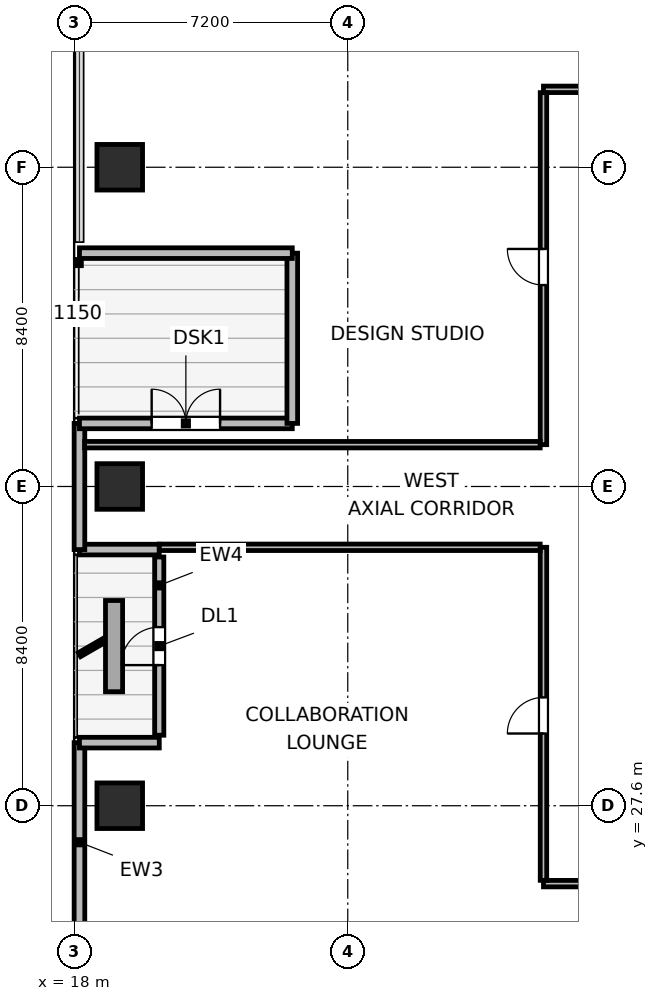
"""IFC4 building model, lengths in metres.
Left out: names, types, materials, properties, quantities, classifications, styles, units other than length and angle.
Written with IfcOpenShell. Run it as: python <this file> out.ifc"""

import sys

from ifc_helpers import new_model, si_unit, direction, frame, frame_2d, origin, origin_2d, place, context, subcontext, project, spatial, rectangle, extrude, element, fill, save


model = new_model("IFC4")
c1 = context("Model", 3, precision=1e-05, world=origin(), true_north=direction((0.0, 1.0)))
c2 = subcontext(c1, "Body", "Model", "MODEL_VIEW")
j1 = project(units=[si_unit("LENGTHUNIT", "METRE"), si_unit("PLANEANGLEUNIT", "RADIAN")], contexts=[c1])
p1 = place(None, origin())
s1 = spatial("IfcSite", under=j1, at=p1, CompositionType="ELEMENT")
p2 = place(p1, origin())
s2 = spatial("IfcBuilding", under=s1, at=p2, CompositionType="ELEMENT")
p3 = place(p2, frame((0.0, 0.0, 181.8)))
s3 = spatial("IfcBuildingStorey", under=s2, at=p3, CompositionType="ELEMENT", Elevation=181.8)
for number, where, z_axis, x_axis in (
    (1, (19.2, 27.6, 0.0), (0.0, 0.0, 1.0), (1.0, 0.0, 0.0)),
    (2, (19.2, 36.0, 0.0), (0.0, 0.0, 1.0), (1.0, 0.0, 0.0)),
    (3, (19.2, 44.4, 0.0), (0.0, 0.0, 1.0), (1.0, 0.0, 0.0)),
):
    element("IfcColumn", number, at=place(p3, frame(where, z_axis=z_axis, x_axis=x_axis)), inside=s3, PredefinedType="COLUMN", context=c2, shape_type="SweptSolid", body=[
        extrude(rectangle(XDim=1.2, YDim=1.2, at=origin_2d()), origin(), (0.0, 0.0, 1.0), 4.5),
    ])
p4 = place(p3, frame((18.14, 24.018, 0.0), z_axis=(0.0, 0.0, 1.0), x_axis=(0.0, 1.0, 0.0)))
e4 = element("IfcWall", 4, at=p4, inside=s3, PredefinedType="SOLIDWALL", context=c2, shape_type="SweptSolid", body=[
    extrude(rectangle(XDim=5.242, YDim=0.28, at=frame_2d((2.621, 0.0))), origin(), (0.0, 0.0, 1.0), 4.28),
])
p5 = place(p3, frame((18.14, 29.26, 0.0), z_axis=(0.0, 0.0, 1.0), x_axis=(1.0, 0.0, 0.0)))
e5 = element("IfcWall", 5, at=p5, inside=s3, PredefinedType="SOLIDWALL", context=c2, shape_type="SweptSolid", body=[
    extrude(rectangle(XDim=2.1, YDim=0.28, at=frame_2d((1.05, 0.0))), origin(), (0.0, 0.0, 1.0), 3.716),
])
p6 = place(p3, frame((20.24, 29.455, 0.0), z_axis=(0.0, 0.0, 1.0), x_axis=(0.0, 1.0, 0.0)))
e6 = element("IfcWall", 6, at=p6, inside=s3, PredefinedType="SOLIDWALL", context=c2, shape_type="SweptSolid", body=[
    extrude(rectangle(XDim=4.69, YDim=0.24, at=frame_2d((2.345, 0.0))), origin(), (0.0, 0.0, 1.0), 3.848),
])
p7 = place(p6, frame((1.845, 0.0, 0.0)))
e7 = element("IfcOpeningElement", 7, at=p7, cuts=e6, PredefinedType="OPENING", context=c2, shape_type="SweptSolid", body=[
    extrude(rectangle(XDim=1.0, YDim=2.02, at=frame_2d((0.5, 1.01))), frame((0.0, 0.13, 0.0), z_axis=(0.0, -1.0, 0.0), x_axis=(1.0, 0.0, 0.0)), (0.0, 0.0, 1.0), 0.26),
])
p8 = place(p3, frame((20.24, 34.34, 0.0), z_axis=(0.0, 0.0, 1.0), x_axis=(-1.0, 0.0, 0.0)))
e8 = element("IfcWall", 8, at=p8, inside=s3, PredefinedType="SOLIDWALL", context=c2, shape_type="SweptSolid", body=[
    extrude(rectangle(XDim=2.1, YDim=0.28, at=frame_2d((1.05, 0.0))), origin(), (0.0, 0.0, 1.0), 3.716),
])
p9 = place(p3, frame((18.14, 34.34, 0.0), z_axis=(0.0, 0.0, 1.0), x_axis=(0.0, 1.0, 0.0)))
e9 = element("IfcWall", 9, at=p9, inside=s3, PredefinedType="SOLIDWALL", context=c2, shape_type="SweptSolid", body=[
    extrude(rectangle(XDim=3.32, YDim=0.28, at=frame_2d((1.66, 0.0))), origin(), (0.0, 0.0, 1.0), 4.28),
])
p10 = place(p3, frame((18.14, 37.66, 0.0), z_axis=(0.0, 0.0, 1.0), x_axis=(1.0, 0.0, 0.0)))
e10 = element("IfcWall", 10, at=p10, inside=s3, PredefinedType="SOLIDWALL", context=c2, shape_type="SweptSolid", body=[
    extrude(rectangle(XDim=5.6, YDim=0.28, at=frame_2d((2.8, 0.0))), origin(), (0.0, 0.0, 1.0), 3.716),
])
p11 = place(p10, frame((1.9, 0.0, 0.0)))
e11 = element("IfcOpeningElement", 11, at=p11, cuts=e10, PredefinedType="OPENING", context=c2, shape_type="SweptSolid", body=[
    extrude(rectangle(XDim=1.8, YDim=2.1, at=frame_2d((0.9, 1.05))), frame((0.0, 0.15, 0.0), z_axis=(0.0, -1.0, 0.0), x_axis=(1.0, 0.0, 0.0)), (0.0, 0.0, 1.0), 0.3),
])
p12 = place(p3, frame((23.74, 37.66, 0.0), z_axis=(0.0, 0.0, 1.0), x_axis=(0.0, 1.0, 0.0)))
e12 = element("IfcWall", 12, at=p12, inside=s3, PredefinedType="SOLIDWALL", context=c2, shape_type="SweptSolid", body=[
    extrude(rectangle(XDim=4.48, YDim=0.28, at=frame_2d((2.24, 0.0))), origin(), (0.0, 0.0, 1.0), 3.848),
])
p13 = place(p3, frame((23.74, 42.14, 0.0), z_axis=(0.0, 0.0, 1.0), x_axis=(-1.0, 0.0, 0.0)))
e13 = element("IfcWall", 13, at=p13, inside=s3, PredefinedType="SOLIDWALL", context=c2, shape_type="SweptSolid", body=[
    extrude(rectangle(XDim=5.6, YDim=0.28, at=frame_2d((2.8, 0.0))), origin(), (0.0, 0.0, 1.0), 3.716),
])
p14 = place(p3, frame((30.35, 25.55, 0.0), z_axis=(0.0, 0.0, 1.0), x_axis=(1.0, 0.0, 0.0)))
e14 = element("IfcWall", 14, at=p14, inside=s3, PredefinedType="PARTITIONING", context=c2, shape_type="SweptSolid", body=[
    extrude(rectangle(XDim=33.25, YDim=0.17, at=frame_2d((16.625, 0.0))), origin(), (0.0, 0.0, 1.0), 4.28),
])
p15 = place(p14, frame((7.84, 0.0, 0.0)))
e15 = element("IfcOpeningElement", 15, at=p15, cuts=e14, PredefinedType="OPENING", context=c2, shape_type="SweptSolid", body=[
    extrude(rectangle(XDim=0.95, YDim=2.04, at=frame_2d((0.475, 1.02))), frame((0.0, 0.095, 0.0), z_axis=(0.0, -1.0, 0.0), x_axis=(1.0, 0.0, 0.0)), (0.0, 0.0, 1.0), 0.19),
])
p16 = place(p14, frame((24.465, 0.0, 0.0)))
e16 = element("IfcOpeningElement", 16, at=p16, cuts=e14, PredefinedType="OPENING", context=c2, shape_type="SweptSolid", body=[
    extrude(rectangle(XDim=0.95, YDim=2.04, at=frame_2d((0.475, 1.02))), frame((0.0, 0.095, 0.0), z_axis=(0.0, -1.0, 0.0), x_axis=(1.0, 0.0, 0.0)), (0.0, 0.0, 1.0), 0.19),
])
p17 = place(p3, frame((30.35, 46.45, 0.0), z_axis=(0.0, 0.0, 1.0), x_axis=(1.0, 0.0, 0.0)))
e17 = element("IfcWall", 17, at=p17, inside=s3, PredefinedType="PARTITIONING", context=c2, shape_type="SweptSolid", body=[
    extrude(rectangle(XDim=33.25, YDim=0.17, at=frame_2d((16.625, 0.0))), origin(), (0.0, 0.0, 1.0), 4.28),
])
p18 = place(p17, frame((3.83, 0.0, 0.0)))
e18 = element("IfcOpeningElement", 18, at=p18, cuts=e17, PredefinedType="OPENING", context=c2, shape_type="SweptSolid", body=[
    extrude(rectangle(XDim=0.95, YDim=2.04, at=frame_2d((0.475, 1.02))), frame((0.0, 0.095, 0.0), z_axis=(0.0, -1.0, 0.0), x_axis=(1.0, 0.0, 0.0)), (0.0, 0.0, 1.0), 0.19),
])
p19 = place(p17, frame((9.495, 0.0, 0.0)))
e19 = element("IfcOpeningElement", 19, at=p19, cuts=e17, PredefinedType="OPENING", context=c2, shape_type="SweptSolid", body=[
    extrude(rectangle(XDim=0.95, YDim=2.04, at=frame_2d((0.475, 1.02))), frame((0.0, 0.095, 0.0), z_axis=(0.0, -1.0, 0.0), x_axis=(1.0, 0.0, 0.0)), (0.0, 0.0, 1.0), 0.19),
])
p20 = place(p17, frame((14.915, 0.0, 0.0)))
e20 = element("IfcOpeningElement", 20, at=p20, cuts=e17, PredefinedType="OPENING", context=c2, shape_type="SweptSolid", body=[
    extrude(rectangle(XDim=0.95, YDim=2.04, at=frame_2d((0.475, 1.02))), frame((0.0, 0.095, 0.0), z_axis=(0.0, -1.0, 0.0), x_axis=(1.0, 0.0, 0.0)), (0.0, 0.0, 1.0), 0.19),
])
p21 = place(p17, frame((21.945, 0.0, 0.0)))
e21 = element("IfcOpeningElement", 21, at=p21, cuts=e17, PredefinedType="OPENING", context=c2, shape_type="SweptSolid", body=[
    extrude(rectangle(XDim=0.95, YDim=2.04, at=frame_2d((0.475, 1.02))), frame((0.0, 0.095, 0.0), z_axis=(0.0, -1.0, 0.0), x_axis=(1.0, 0.0, 0.0)), (0.0, 0.0, 1.0), 0.19),
])
p22 = place(p17, frame((28.845, 0.0, 0.0)))
e22 = element("IfcOpeningElement", 22, at=p22, cuts=e17, PredefinedType="OPENING", context=c2, shape_type="SweptSolid", body=[
    extrude(rectangle(XDim=0.95, YDim=2.04, at=frame_2d((0.475, 1.02))), frame((0.0, 0.095, 0.0), z_axis=(0.0, -1.0, 0.0), x_axis=(1.0, 0.0, 0.0)), (0.0, 0.0, 1.0), 0.19),
])
p23 = place(p3, frame((30.35, 25.637, 0.0), z_axis=(0.0, 0.0, 1.0), x_axis=(0.0, 1.0, 0.0)))
e23 = element("IfcWall", 23, at=p23, inside=s3, PredefinedType="PARTITIONING", context=c2, shape_type="SweptSolid", body=[
    extrude(rectangle(XDim=8.763, YDim=0.17, at=frame_2d((4.381, 0.0))), origin(), (0.0, 0.0, 1.0), 4.28),
])
p24 = place(p23, frame((3.863, 0.0, 0.0)))
e24 = element("IfcOpeningElement", 24, at=p24, cuts=e23, PredefinedType="OPENING", context=c2, shape_type="SweptSolid", body=[
    extrude(rectangle(XDim=0.95, YDim=2.04, at=frame_2d((0.475, 1.02))), frame((0.0, 0.095, 0.0), z_axis=(0.0, -1.0, 0.0), x_axis=(1.0, 0.0, 0.0)), (0.0, 0.0, 1.0), 0.19),
])
p25 = place(p3, frame((30.35, 37.1, 0.0), z_axis=(0.0, 0.0, 1.0), x_axis=(0.0, 1.0, 0.0)))
e25 = element("IfcWall", 25, at=p25, inside=s3, PredefinedType="PARTITIONING", context=c2, shape_type="SweptSolid", body=[
    extrude(rectangle(XDim=9.263, YDim=0.17, at=frame_2d((4.631, 0.0))), origin(), (0.0, 0.0, 1.0), 4.28),
])
p26 = place(p25, frame((4.2, 0.0, 0.0)))
e26 = element("IfcOpeningElement", 26, at=p26, cuts=e25, PredefinedType="OPENING", context=c2, shape_type="SweptSolid", body=[
    extrude(rectangle(XDim=0.95, YDim=2.04, at=frame_2d((0.475, 1.02))), frame((0.0, 0.095, 0.0), z_axis=(0.0, -1.0, 0.0), x_axis=(1.0, 0.0, 0.0)), (0.0, 0.0, 1.0), 0.19),
])
p27 = place(p3, frame((20.24, 34.4, 0.0), z_axis=(0.0, 0.0, 1.0), x_axis=(1.0, 0.0, 0.0)))
e27 = element("IfcWall", 27, at=p27, inside=s3, PredefinedType="PARTITIONING", context=c2, shape_type="SweptSolid", body=[
    extrude(rectangle(XDim=10.023, YDim=0.17, at=frame_2d((5.011, 0.0))), origin(), (0.0, 0.0, 1.0), 4.28),
])
p28 = place(p3, frame((18.275, 37.1, 0.0), z_axis=(0.0, 0.0, 1.0), x_axis=(1.0, 0.0, 0.0)))
e28 = element("IfcWall", 28, at=p28, inside=s3, PredefinedType="PARTITIONING", context=c2, shape_type="SweptSolid", body=[
    extrude(rectangle(XDim=11.988, YDim=0.17, at=frame_2d((5.994, 0.0))), origin(), (0.0, 0.0, 1.0), 4.28),
])
p29 = place(p7, origin())
e29 = element("IfcDoor", 29, at=p29, inside=s3, OperationType="SINGLE_SWING_LEFT", PredefinedType="DOOR", context=c2, shape_type="SweptSolid", body=[
    extrude(rectangle(XDim=1.0, YDim=2.02, at=frame_2d((0.5, 1.01))), frame((0.0, 0.025, 0.0), z_axis=(0.0, -1.0, 0.0), x_axis=(1.0, 0.0, 0.0)), (0.0, 0.0, 1.0), 0.05),
])
fill(e7, e29)
p30 = place(p11, origin())
e30 = element("IfcDoor", 30, at=p30, inside=s3, OperationType="DOUBLE_DOOR_SINGLE_SWING", PredefinedType="DOOR", context=c2, shape_type="SweptSolid", body=[
    extrude(rectangle(XDim=1.8, YDim=2.1, at=frame_2d((0.9, 1.05))), frame((0.0, 0.025, 0.0), z_axis=(0.0, -1.0, 0.0), x_axis=(1.0, 0.0, 0.0)), (0.0, 0.0, 1.0), 0.05),
])
fill(e11, e30)
p31 = place(p24, origin())
e31 = element("IfcDoor", 31, at=p31, inside=s3, OperationType="SINGLE_SWING_LEFT", PredefinedType="DOOR", context=c2, shape_type="SweptSolid", body=[
    extrude(rectangle(XDim=0.95, YDim=2.04, at=frame_2d((0.475, 1.02))), frame((0.0, 0.025, 0.0), z_axis=(0.0, -1.0, 0.0), x_axis=(1.0, 0.0, 0.0)), (0.0, 0.0, 1.0), 0.05),
])
fill(e24, e31)
p32 = place(p26, origin())
e32 = element("IfcDoor", 32, at=p32, inside=s3, OperationType="SINGLE_SWING_RIGHT", PredefinedType="DOOR", context=c2, shape_type="SweptSolid", body=[
    extrude(rectangle(XDim=0.95, YDim=2.04, at=frame_2d((0.475, 1.02))), frame((0.0, 0.025, 0.0), z_axis=(0.0, -1.0, 0.0), x_axis=(1.0, 0.0, 0.0)), (0.0, 0.0, 1.0), 0.05),
])
fill(e26, e32)
save(model, sys.argv[1])
